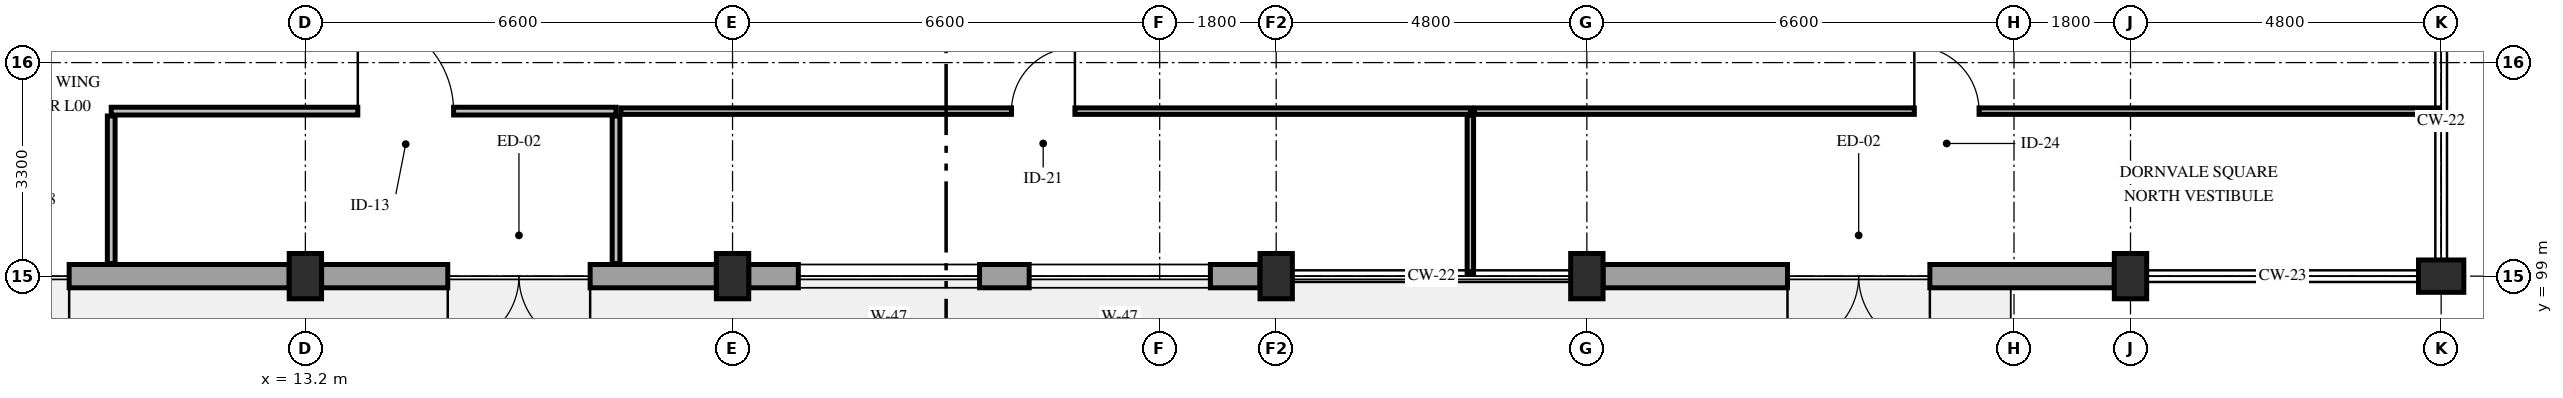
"""IFC4 building model, lengths in metres.
Left out: names, types, materials, properties, quantities, classifications, styles, units other than length and angle.
Written with IfcOpenShell. Run it as: python <this file> out.ifc"""

import sys

from ifc_helpers import new_model, si_unit, direction, frame, frame_2d, origin, origin_2d, place, context, subcontext, project, spatial, rectangle, extrude, element, fill, save


model = new_model("IFC4")
c1 = context("Model", 3, precision=1e-05, world=origin(), true_north=direction((0.0, 1.0)))
c2 = subcontext(c1, "Body", "Model", "MODEL_VIEW")
j1 = project(units=[si_unit("LENGTHUNIT", "METRE"), si_unit("PLANEANGLEUNIT", "RADIAN")], contexts=[c1])
p1 = place(None, origin())
s1 = spatial("IfcSite", under=j1, at=p1, CompositionType="ELEMENT")
p2 = place(p1, origin())
s2 = spatial("IfcBuilding", under=s1, at=p2, CompositionType="ELEMENT")
p3 = place(p2, origin())
s3 = spatial("IfcBuildingStorey", under=s2, at=p3, CompositionType="ELEMENT", Elevation=0.0)
for number, where, z_axis, x_axis in (
    (1, (13.2, 99.0, 0.0), (0.0, 0.0, 1.0), (1.0, 0.0, 0.0)),
    (2, (19.8, 99.0, 0.0), (0.0, 0.0, 1.0), (1.0, 0.0, 0.0)),
    (3, (28.2, 99.0, 0.0), (0.0, 0.0, 1.0), (1.0, 0.0, 0.0)),
    (4, (33.0, 99.0, 0.0), (0.0, 0.0, 1.0), (1.0, 0.0, 0.0)),
    (5, (41.4, 99.0, 0.0), (0.0, 0.0, 1.0), (1.0, 0.0, 0.0)),
    (6, (46.2, 99.0, 0.0), (0.0, 0.0, 1.0), (0.0, 1.0, 0.0)),
):
    element("IfcColumn", number, at=place(p3, frame(where, z_axis=z_axis, x_axis=x_axis)), inside=s3, PredefinedType="PILASTER", context=c2, shape_type="SweptSolid", body=[
        extrude(rectangle(XDim=0.5, YDim=0.7, at=origin_2d()), origin(), (0.0, 0.0, 1.0), 5.4),
    ])
p4 = place(p3, frame((41.15, 99.0, 0.0), z_axis=(0.0, 0.0, 1.0), x_axis=(-1.0, 0.0, 0.0)))
e7 = element("IfcWall", 7, at=p4, inside=s3, PredefinedType="STANDARD", context=c2, shape_type="SweptSolid", body=[
    extrude(rectangle(XDim=7.9, YDim=0.36, at=frame_2d((3.95, 0.0))), origin(), (0.0, 0.0, 1.0), 3.96),
])
p5 = place(p4, frame((2.85, 0.0, 0.0)))
e8 = element("IfcOpeningElement", 8, at=p5, cuts=e7, PredefinedType="OPENING", context=c2, shape_type="SweptSolid", body=[
    extrude(rectangle(XDim=2.2, YDim=2.55, at=frame_2d((1.1, 1.275))), frame((0.0, 0.195, 0.0), z_axis=(0.0, -1.0, 0.0), x_axis=(1.0, 0.0, 0.0)), (0.0, 0.0, 1.0), 0.39),
])
p6 = place(p3, frame((27.95, 99.0, 0.0), z_axis=(0.0, 0.0, 1.0), x_axis=(-1.0, 0.0, 0.0)))
e9 = element("IfcWall", 9, at=p6, inside=s3, PredefinedType="STANDARD", context=c2, shape_type="SweptSolid", body=[
    extrude(rectangle(XDim=7.9, YDim=0.36, at=frame_2d((3.95, 0.0))), origin(), (0.0, 0.0, 1.0), 4.53),
])
p7 = place(p6, frame((0.767, 0.0, 0.85)))
e10 = element("IfcOpeningElement", 10, at=p7, cuts=e9, PredefinedType="OPENING", context=c2, shape_type="SweptSolid", body=[
    extrude(rectangle(XDim=2.8, YDim=2.08, at=frame_2d((1.4, 1.04))), frame((0.0, 0.195, 0.0), z_axis=(0.0, -1.0, 0.0), x_axis=(1.0, 0.0, 0.0)), (0.0, 0.0, 1.0), 0.39),
])
p8 = place(p6, frame((4.333, 0.0, 0.85)))
e11 = element("IfcOpeningElement", 11, at=p8, cuts=e9, PredefinedType="OPENING", context=c2, shape_type="SweptSolid", body=[
    extrude(rectangle(XDim=2.8, YDim=2.08, at=frame_2d((1.4, 1.04))), frame((0.0, 0.195, 0.0), z_axis=(0.0, -1.0, 0.0), x_axis=(1.0, 0.0, 0.0)), (0.0, 0.0, 1.0), 0.39),
])
p9 = place(p3, frame((19.55, 99.0, 0.0), z_axis=(0.0, 0.0, 1.0), x_axis=(-1.0, 0.0, 0.0)))
e12 = element("IfcWall", 12, at=p9, inside=s3, PredefinedType="STANDARD", context=c2, shape_type="SweptSolid", body=[
    extrude(rectangle(XDim=6.1, YDim=0.36, at=frame_2d((3.05, 0.0))), origin(), (0.0, 0.0, 1.0), 4.53),
])
p10 = place(p9, frame((1.95, 0.0, 0.0)))
e13 = element("IfcOpeningElement", 13, at=p10, cuts=e12, PredefinedType="OPENING", context=c2, shape_type="SweptSolid", body=[
    extrude(rectangle(XDim=2.2, YDim=2.55, at=frame_2d((1.1, 1.275))), frame((0.0, 0.195, 0.0), z_axis=(0.0, -1.0, 0.0), x_axis=(1.0, 0.0, 0.0)), (0.0, 0.0, 1.0), 0.39),
])
p11 = place(p3, frame((12.95, 99.0, 0.0), z_axis=(0.0, 0.0, 1.0), x_axis=(-1.0, 0.0, 0.0)))
e14 = element("IfcWall", 14, at=p11, inside=s3, PredefinedType="STANDARD", context=c2, shape_type="SweptSolid", body=[
    extrude(rectangle(XDim=7.9, YDim=0.36, at=frame_2d((3.95, 0.0))), origin(), (0.0, 0.0, 1.0), 4.53),
])
p12 = place(p11, frame((3.4, 0.0, 0.0)))
e15 = element("IfcOpeningElement", 15, at=p12, cuts=e14, PredefinedType="OPENING", context=c2, shape_type="SweptSolid", body=[
    extrude(rectangle(XDim=1.1, YDim=2.3, at=frame_2d((0.55, 1.15))), frame((0.0, 0.195, 0.0), z_axis=(0.0, -1.0, 0.0), x_axis=(1.0, 0.0, 0.0)), (0.0, 0.0, 1.0), 0.39),
])
p13 = place(p3, frame((10.2, 101.55, 0.0), z_axis=(0.0, 0.0, 1.0), x_axis=(1.0, 0.0, 0.0)))
e16 = element("IfcWall", 16, at=p13, inside=s3, PredefinedType="PARTITIONING", context=c2, shape_type="SweptSolid", body=[
    extrude(rectangle(XDim=7.8, YDim=0.12, at=frame_2d((3.9, 0.0))), origin(), (0.0, 0.0, 1.0), 4.73),
])
p14 = place(p13, frame((3.81, 0.0, 0.0)))
e17 = element("IfcOpeningElement", 17, at=p14, cuts=e16, PredefinedType="OPENING", context=c2, shape_type="SweptSolid", body=[
    extrude(rectangle(XDim=1.48, YDim=2.3, at=frame_2d((0.74, 1.15))), frame((0.0, 0.075, 0.0), z_axis=(0.0, -1.0, 0.0), x_axis=(1.0, 0.0, 0.0)), (0.0, 0.0, 1.0), 0.15),
])
for number, where, z_axis, x_axis in (
    (18, (10.2, 99.195, 0.0), (0.0, 0.0, 1.0), (0.0, 1.0, 0.0)),
    (19, (18.0, 99.195, 0.0), (0.0, 0.0, 1.0), (0.0, 1.0, 0.0)),
):
    element("IfcWall", number, at=place(p3, frame(where, z_axis=z_axis, x_axis=x_axis)), inside=s3, PredefinedType="PARTITIONING", context=c2, shape_type="SweptSolid", body=[
        extrude(rectangle(XDim=2.28, YDim=0.12, at=frame_2d((1.14, 0.0))), origin(), (0.0, 0.0, 1.0), 4.53),
    ])
p15 = place(p3, frame((18.075, 101.55, 0.0), z_axis=(0.0, 0.0, 1.0), x_axis=(1.0, 0.0, 0.0)))
e20 = element("IfcWall", 20, at=p15, inside=s3, PredefinedType="PARTITIONING", context=c2, shape_type="SweptSolid", body=[
    extrude(rectangle(XDim=13.125, YDim=0.1, at=frame_2d((6.562, 0.0))), origin(), (0.0, 0.0, 1.0), 4.73),
])
p16 = place(p15, frame((6.035, 0.0, 0.0)))
e21 = element("IfcOpeningElement", 21, at=p16, cuts=e20, PredefinedType="OPENING", context=c2, shape_type="SweptSolid", body=[
    extrude(rectangle(XDim=0.98, YDim=2.2, at=frame_2d((0.49, 1.1))), frame((0.0, 0.065, 0.0), z_axis=(0.0, -1.0, 0.0), x_axis=(1.0, 0.0, 0.0)), (0.0, 0.0, 1.0), 0.13),
])
p17 = place(p3, frame((31.2, 99.04, 0.0), z_axis=(0.0, 0.0, 1.0), x_axis=(0.0, 1.0, 0.0)))
e22 = element("IfcWall", 22, at=p17, inside=s3, PredefinedType="PARTITIONING", context=c2, shape_type="SweptSolid", body=[
    extrude(rectangle(XDim=2.445, YDim=0.1, at=frame_2d((1.223, 0.0))), origin(), (0.0, 0.0, 1.0), 4.68),
])
p18 = place(p3, frame((31.265, 101.55, 0.0), z_axis=(0.0, 0.0, 1.0), x_axis=(1.0, 0.0, 0.0)))
e23 = element("IfcWall", 23, at=p18, inside=s3, PredefinedType="PARTITIONING", context=c2, shape_type="SweptSolid", body=[
    extrude(rectangle(XDim=14.895, YDim=0.1, at=frame_2d((7.448, 0.0))), origin(), (0.0, 0.0, 1.0), 4.68),
])
p19 = place(p18, frame((6.795, 0.0, 0.0)))
e24 = element("IfcOpeningElement", 24, at=p19, cuts=e23, PredefinedType="OPENING", context=c2, shape_type="SweptSolid", body=[
    extrude(rectangle(XDim=1.0, YDim=2.15, at=frame_2d((0.5, 1.075))), frame((0.0, 0.065, 0.0), z_axis=(0.0, -1.0, 0.0), x_axis=(1.0, 0.0, 0.0)), (0.0, 0.0, 1.0), 0.13),
])
p20 = place(p5, origin())
e25 = element("IfcDoor", 25, at=p20, inside=s3, OperationType="DOUBLE_DOOR_SINGLE_SWING", PredefinedType="DOOR", context=c2, shape_type="SweptSolid", body=[
    extrude(rectangle(XDim=2.2, YDim=2.55, at=frame_2d((1.1, 1.275))), frame((0.0, 0.025, 0.0), z_axis=(0.0, -1.0, 0.0), x_axis=(1.0, 0.0, 0.0)), (0.0, 0.0, 1.0), 0.05),
])
fill(e8, e25)
p21 = place(p7, origin())
e26 = element("IfcWindow", 26, at=p21, inside=s3, PartitioningType="DOUBLE_PANEL_VERTICAL", PredefinedType="WINDOW", context=c2, shape_type="SweptSolid", body=[
    extrude(rectangle(XDim=2.8, YDim=2.08, at=frame_2d((1.4, 1.04))), frame((0.0, 0.03, 0.0), z_axis=(0.0, -1.0, 0.0), x_axis=(1.0, 0.0, 0.0)), (0.0, 0.0, 1.0), 0.06),
])
fill(e10, e26)
p22 = place(p8, origin())
e27 = element("IfcWindow", 27, at=p22, inside=s3, PartitioningType="DOUBLE_PANEL_VERTICAL", PredefinedType="WINDOW", context=c2, shape_type="SweptSolid", body=[
    extrude(rectangle(XDim=2.8, YDim=2.08, at=frame_2d((1.4, 1.04))), frame((0.0, 0.03, 0.0), z_axis=(0.0, -1.0, 0.0), x_axis=(1.0, 0.0, 0.0)), (0.0, 0.0, 1.0), 0.06),
])
fill(e11, e27)
p23 = place(p10, origin())
e28 = element("IfcDoor", 28, at=p23, inside=s3, OperationType="DOUBLE_DOOR_SINGLE_SWING", PredefinedType="DOOR", context=c2, shape_type="SweptSolid", body=[
    extrude(rectangle(XDim=2.2, YDim=2.55, at=frame_2d((1.1, 1.275))), frame((0.0, 0.025, 0.0), z_axis=(0.0, -1.0, 0.0), x_axis=(1.0, 0.0, 0.0)), (0.0, 0.0, 1.0), 0.05),
])
fill(e13, e28)
p24 = place(p12, origin())
e29 = element("IfcDoor", 29, at=p24, inside=s3, OperationType="SINGLE_SWING_LEFT", PredefinedType="DOOR", context=c2, shape_type="SweptSolid", body=[
    extrude(rectangle(XDim=1.1, YDim=2.3, at=frame_2d((0.55, 1.15))), frame((0.0, 0.025, 0.0), z_axis=(0.0, -1.0, 0.0), x_axis=(1.0, 0.0, 0.0)), (0.0, 0.0, 1.0), 0.05),
])
fill(e15, e29)
p25 = place(p14, origin())
e30 = element("IfcDoor", 30, at=p25, inside=s3, OperationType="SINGLE_SWING_LEFT", PredefinedType="DOOR", context=c2, shape_type="SweptSolid", body=[
    extrude(rectangle(XDim=1.48, YDim=2.3, at=frame_2d((0.74, 1.15))), frame((0.0, 0.025, 0.0), z_axis=(0.0, -1.0, 0.0), x_axis=(1.0, 0.0, 0.0)), (0.0, 0.0, 1.0), 0.05),
])
fill(e17, e30)
p26 = place(p16, origin())
e31 = element("IfcDoor", 31, at=p26, inside=s3, OperationType="SINGLE_SWING_RIGHT", PredefinedType="DOOR", context=c2, shape_type="SweptSolid", body=[
    extrude(rectangle(XDim=0.98, YDim=2.2, at=frame_2d((0.49, 1.1))), frame((0.0, 0.025, 0.0), z_axis=(0.0, -1.0, 0.0), x_axis=(1.0, 0.0, 0.0)), (0.0, 0.0, 1.0), 0.05),
])
fill(e21, e31)
p27 = place(p19, origin())
e32 = element("IfcDoor", 32, at=p27, inside=s3, OperationType="SINGLE_SWING_LEFT", PredefinedType="DOOR", context=c2, shape_type="SweptSolid", body=[
    extrude(rectangle(XDim=1.0, YDim=2.15, at=frame_2d((0.5, 1.075))), frame((0.0, 0.025, 0.0), z_axis=(0.0, -1.0, 0.0), x_axis=(1.0, 0.0, 0.0)), (0.0, 0.0, 1.0), 0.05),
])
fill(e24, e32)
save(model, sys.argv[1])
